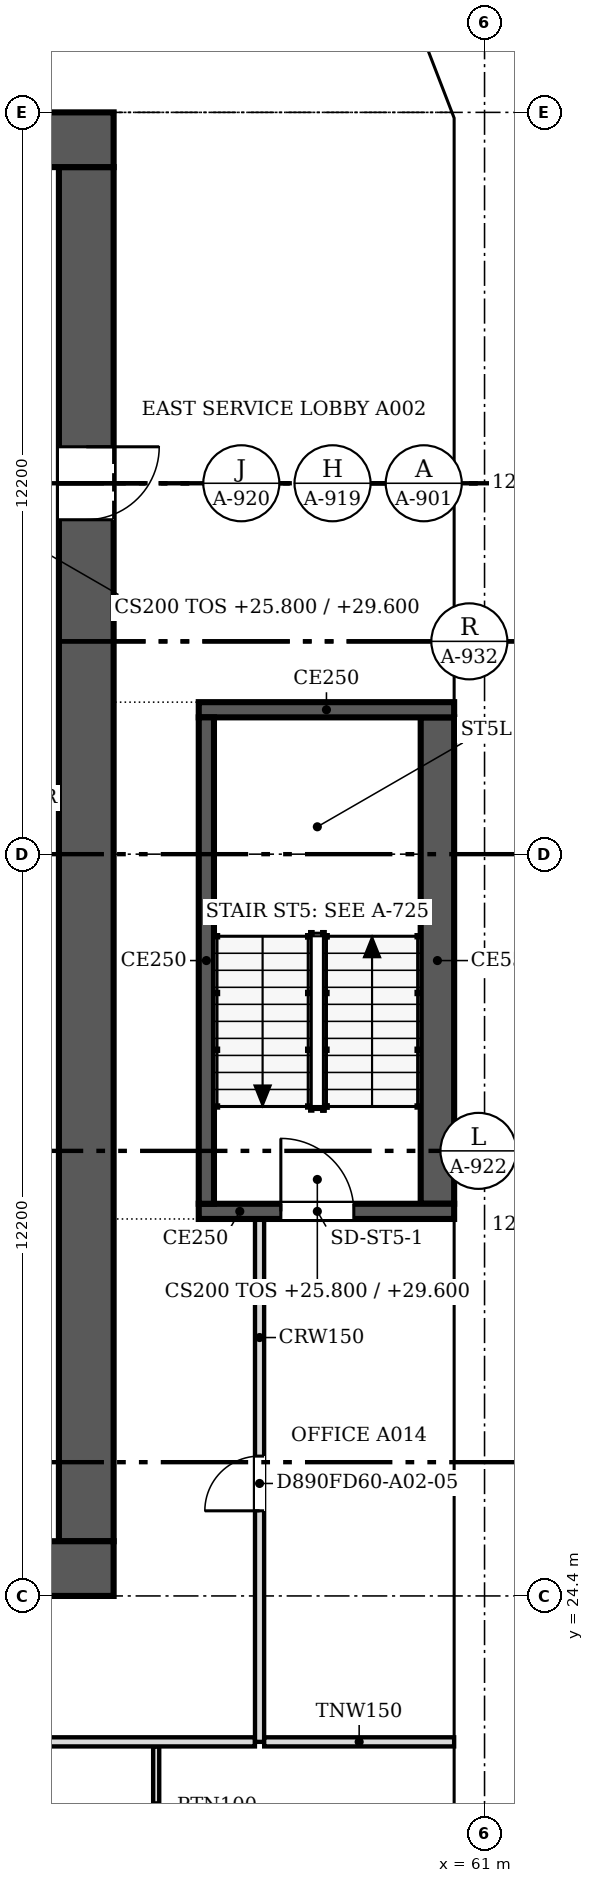
"""IFC4 building model, lengths in metres.
Left out: names, types, materials, properties, quantities, classifications, styles, units other than length and angle.
Written with IfcOpenShell. Run it as: python <this file> out.ifc"""

import sys

from ifc_helpers import new_model, si_unit, direction, frame, frame_2d, origin, place, context, subcontext, project, spatial, polyline, rectangle, outline, extrude, faceted_brep, source, transform, mapped, element, fill, save


model = new_model("IFC4")
c1 = context("Model", 3, precision=1e-05, world=origin(), true_north=direction((0.0, 1.0)))
c2 = subcontext(c1, "Body", "Model", "MODEL_VIEW")
j1 = project(units=[si_unit("LENGTHUNIT", "METRE"), si_unit("PLANEANGLEUNIT", "RADIAN")], contexts=[c1])
p1 = place(None, origin())
s1 = spatial("IfcSite", under=j1, at=p1, CompositionType="ELEMENT")
p2 = place(p1, origin())
s2 = spatial("IfcBuilding", under=s1, at=p2, CompositionType="ELEMENT")
p3 = place(p2, frame((0.0, 0.0, 25.8)))
s3 = spatial("IfcBuildingStorey", under=s2, at=p3, CompositionType="ELEMENT", Elevation=25.8)
m1 = source(origin(), c2, "Body", "Brep", [
    faceted_brep([(6.1, -0.25, 0.0), (3.05, -0.25, 3.8), (0.0, -0.25, 0.0), (6.1, -0.25, 0.0), (0.0, 0.25, 0.0), (3.05, 0.25, 3.8), (6.1, 0.25, 0.0), (6.1, 0.25, 0.0)], [[[0, 1, 2, 3]], [[4, 5, 6, 7]], [[6, 5, 1, 0]], [[5, 4, 2, 1]], [[4, 7, 3, 2]], [[3, 7, 6, 0]]]),
])
p4 = place(p3, frame((60.75, 18.3, 0.0), z_axis=(0.0, 0.0, 1.0), x_axis=(0.0, 1.0, 0.0)))
e1 = element("IfcWall", 1, at=p4, inside=s3, PredefinedType="SOLIDWALL", context=c2, shape_type="MappedRepresentation", body=[
    mapped(m1, transform((0.0, 0.0, 0.0), scale=1.0)),
])
m2 = source(origin(), c2, "Body", "SweptSolid", [
    extrude(outline(polyline([(5.579, 0.25), (3.05, 3.401), (0.521, 0.25), (5.579, 0.25)])), frame((0.0, 0.26, 0.0), z_axis=(0.0, -1.0, 0.0), x_axis=(1.0, 0.0, 0.0)), (0.0, 0.0, 1.0), 0.52),
])
p5 = place(p4, origin())
e2 = element("IfcOpeningElement", 2, at=p5, cuts=e1, PredefinedType="OPENING", context=c2, shape_type="MappedRepresentation", body=[
    mapped(m2, transform((0.0, 0.0, 0.0), scale=1.0)),
])
m3 = source(origin(), c2, "Body", "SweptSolid", [
    extrude(outline(polyline([(6.1, 0.0), (3.05, 3.8), (0.0, 0.0), (6.1, 0.0)])), frame((0.0, 0.25, 0.0), z_axis=(0.0, -1.0, 0.0), x_axis=(1.0, 0.0, 0.0)), (0.0, 0.0, 1.0), 0.5),
])
p6 = place(p3, frame((60.75, 24.4, 0.0), z_axis=(0.0, 0.0, 1.0), x_axis=(0.0, 1.0, 0.0)))
e3 = element("IfcWall", 3, at=p6, inside=s3, PredefinedType="SOLIDWALL", context=c2, shape_type="MappedRepresentation", body=[
    mapped(m3, transform((0.0, 0.0, 0.0), scale=1.0)),
])
p7 = place(p6, origin())
e4 = element("IfcOpeningElement", 4, at=p7, cuts=e3, PredefinedType="OPENING", context=c2, shape_type="MappedRepresentation", body=[
    mapped(m2, transform((0.0, 0.0, 0.0), scale=1.0)),
])
p8 = place(p3, frame((60.75, 30.5, 0.0), z_axis=(0.0, 0.0, 1.0), x_axis=(0.0, 1.0, 0.0)))
e5 = element("IfcWall", 5, at=p8, inside=s3, PredefinedType="SOLIDWALL", context=c2, shape_type="MappedRepresentation", body=[
    mapped(m3, transform((0.0, 0.0, 0.0), scale=1.0)),
])
p9 = place(p8, origin())
e6 = element("IfcOpeningElement", 6, at=p9, cuts=e5, PredefinedType="OPENING", context=c2, shape_type="MappedRepresentation", body=[
    mapped(m2, transform((0.0, 0.0, 0.0), scale=1.0)),
])
p10 = place(p3, frame((60.75, 36.6, 0.0), z_axis=(0.0, 0.0, 1.0), x_axis=(0.0, 1.0, 0.0)))
e7 = element("IfcWall", 7, at=p10, inside=s3, PredefinedType="SOLIDWALL", context=c2, shape_type="MappedRepresentation", body=[
    mapped(m1, transform((0.0, 0.0, 0.0), scale=1.0)),
])
p11 = place(p10, origin())
e8 = element("IfcOpeningElement", 8, at=p11, cuts=e7, PredefinedType="OPENING", context=c2, shape_type="MappedRepresentation", body=[
    mapped(m2, transform((0.0, 0.0, 0.0), scale=1.0)),
])
m4 = source(origin(), c2, "Body", "Brep", [
    faceted_brep([(6.053, -0.25, 0.0), (3.05, -0.25, 3.8), (0.0, -0.25, 0.0), (0.0, 0.25, 0.0), (3.05, 0.25, 3.8), (6.007, 0.25, 0.059), (6.007, 0.25, 0.0), (6.053, 0.0, 0.0)], [[[0, 1, 2]], [[3, 4, 5, 6]], [[5, 4, 1, 0, 7]], [[4, 3, 2, 1]], [[3, 6, 7, 0, 2]], [[7, 6, 5]]]),
])
p12 = place(p3, frame((60.75, 42.7, 0.0), z_axis=(0.0, 0.0, 1.0), x_axis=(0.0, 1.0, 0.0)))
e9 = element("IfcWall", 9, at=p12, inside=s3, PredefinedType="SOLIDWALL", context=c2, shape_type="MappedRepresentation", body=[
    mapped(m4, transform((0.0, 0.0, 0.0), scale=1.0)),
])
m5 = source(origin(), c2, "Body", "SweptSolid", [
    extrude(outline(polyline([(5.537, 0.25), (3.049, 3.399), (0.521, 0.25), (5.537, 0.25)])), frame((0.0, 0.26, 0.0), z_axis=(0.0, -1.0, 0.0), x_axis=(1.0, 0.0, 0.0)), (0.0, 0.0, 1.0), 0.52),
])
p13 = place(p12, origin())
e10 = element("IfcOpeningElement", 10, at=p13, cuts=e9, PredefinedType="OPENING", context=c2, shape_type="MappedRepresentation", body=[
    mapped(m5, transform((0.0, 0.0, 0.0), scale=1.0)),
])
m6 = source(origin(), c2, "Body", "Brep", [
    faceted_brep([(3.003, -0.25, 3.732), (2.95, -0.25, 3.8), (0.0, -0.25, 0.0), (3.003, -0.25, 0.0), (0.047, 0.25, 0.06), (2.898, 0.25, 3.732), (2.898, 0.25, 0.0), (0.047, 0.25, 0.0), (2.95, 0.0, 3.8), (0.0, 0.0, 0.0)], [[[0, 1, 2, 3]], [[4, 5, 6, 7]], [[8, 1, 0]], [[5, 4, 9, 2, 1, 8]], [[7, 6, 3, 2, 9]], [[7, 9, 4]], [[3, 6, 5, 8, 0]]]),
])
p14 = place(p3, frame((60.75, 48.753, 0.0), z_axis=(0.0, 0.0, 1.0), x_axis=(-0.35992665181, 0.932980602862, 0.0)))
e11 = element("IfcWall", 11, at=p14, inside=s3, PredefinedType="SOLIDWALL", context=c2, shape_type="MappedRepresentation", body=[
    mapped(m6, transform((0.0, 0.0, 0.0), scale=1.0)),
])
m7 = source(origin(), c2, "Body", "SweptSolid", [
    extrude(outline(polyline([(2.75, 3.135), (0.511, 0.25), (2.75, 0.25), (2.75, 3.135)])), frame((0.0, 0.26, 0.0), z_axis=(0.0, -1.0, 0.0), x_axis=(1.0, 0.0, 0.0)), (0.0, 0.0, 1.0), 0.52),
])
p15 = place(p14, origin())
e12 = element("IfcOpeningElement", 12, at=p15, cuts=e11, PredefinedType="OPENING", context=c2, shape_type="MappedRepresentation", body=[
    mapped(m7, transform((0.0, 0.0, 0.0), scale=1.0)),
])
p16 = place(p2, frame((0.0, 0.0, 29.6)))
s4 = spatial("IfcBuildingStorey", under=s2, at=p16, CompositionType="ELEMENT", Elevation=29.6)
m8 = source(origin(), c2, "Body", "SweptSolid", [
    extrude(outline(polyline([(3.05, 0.0), (6.1, 3.8), (3.05, 7.6), (0.0, 3.8), (3.05, 0.0)])), frame((0.0, 0.25, 0.0), z_axis=(0.0, -1.0, 0.0), x_axis=(1.0, 0.0, 0.0)), (0.0, 0.0, 1.0), 0.5),
])
p17 = place(p16, frame((60.75, 15.25, -3.8), z_axis=(0.0, 0.0, 1.0), x_axis=(0.0, 1.0, 0.0)))
e13 = element("IfcWall", 13, at=p17, inside=s4, PredefinedType="SOLIDWALL", context=c2, shape_type="MappedRepresentation", body=[
    mapped(m8, transform((0.0, 0.0, 0.0), scale=1.0)),
])
m9 = source(origin(), c2, "Body", "SweptSolid", [
    extrude(outline(polyline([(3.05, 0.399), (5.78, 3.8), (3.05, 7.2), (0.321, 3.8), (3.05, 0.399)])), frame((0.0, 0.26, 0.0), z_axis=(0.0, -1.0, 0.0), x_axis=(1.0, 0.0, 0.0)), (0.0, 0.0, 1.0), 0.52),
])
p18 = place(p17, origin())
e14 = element("IfcOpeningElement", 14, at=p18, cuts=e13, PredefinedType="OPENING", context=c2, shape_type="MappedRepresentation", body=[
    mapped(m9, transform((0.0, 0.0, 0.0), scale=1.0)),
])
m10 = source(origin(), c2, "Body", "Brep", [
    faceted_brep([(3.05, -0.25, 0.0), (6.1, -0.25, 3.8), (6.1, -0.25, 3.8), (3.05, -0.25, 7.6), (0.0, -0.25, 3.8), (0.0, 0.25, 3.8), (3.05, 0.25, 7.6), (6.1, 0.25, 3.8), (6.1, 0.25, 3.8), (3.05, 0.25, 0.0)], [[[0, 1, 2, 3, 4]], [[5, 6, 7, 8, 9]], [[9, 8, 1, 0]], [[7, 6, 3, 2]], [[6, 5, 4, 3]], [[5, 9, 0, 4]], [[1, 8, 7, 2]]]),
])
p19 = place(p16, frame((60.75, 21.35, -3.8), z_axis=(0.0, 0.0, 1.0), x_axis=(0.0, 1.0, 0.0)))
e15 = element("IfcWall", 15, at=p19, inside=s4, PredefinedType="SOLIDWALL", context=c2, shape_type="MappedRepresentation", body=[
    mapped(m10, transform((0.0, 0.0, 0.0), scale=1.0)),
])
p20 = place(p19, origin())
e16 = element("IfcOpeningElement", 16, at=p20, cuts=e15, PredefinedType="OPENING", context=c2, shape_type="MappedRepresentation", body=[
    mapped(m9, transform((0.0, 0.0, 0.0), scale=1.0)),
])
p21 = place(p16, frame((60.75, 27.45, -3.8), z_axis=(0.0, 0.0, 1.0), x_axis=(0.0, 1.0, 0.0)))
e17 = element("IfcWall", 17, at=p21, inside=s4, PredefinedType="SOLIDWALL", context=c2, shape_type="MappedRepresentation", body=[
    mapped(m8, transform((0.0, 0.0, 0.0), scale=1.0)),
])
p22 = place(p21, origin())
e18 = element("IfcOpeningElement", 18, at=p22, cuts=e17, PredefinedType="OPENING", context=c2, shape_type="MappedRepresentation", body=[
    mapped(m9, transform((0.0, 0.0, 0.0), scale=1.0)),
])
p23 = place(p16, frame((60.75, 33.55, -3.8), z_axis=(0.0, 0.0, 1.0), x_axis=(0.0, 1.0, 0.0)))
e19 = element("IfcWall", 19, at=p23, inside=s4, PredefinedType="SOLIDWALL", context=c2, shape_type="MappedRepresentation", body=[
    mapped(m10, transform((0.0, 0.0, 0.0), scale=1.0)),
])
p24 = place(p23, origin())
e20 = element("IfcOpeningElement", 20, at=p24, cuts=e19, PredefinedType="OPENING", context=c2, shape_type="MappedRepresentation", body=[
    mapped(m9, transform((0.0, 0.0, 0.0), scale=1.0)),
])
p25 = place(p16, frame((60.75, 39.65, -3.8), z_axis=(0.0, 0.0, 1.0), x_axis=(0.0, 1.0, 0.0)))
e21 = element("IfcWall", 21, at=p25, inside=s4, PredefinedType="SOLIDWALL", context=c2, shape_type="MappedRepresentation", body=[
    mapped(m8, transform((0.0, 0.0, 0.0), scale=1.0)),
])
p26 = place(p25, origin())
e22 = element("IfcOpeningElement", 22, at=p26, cuts=e21, PredefinedType="OPENING", context=c2, shape_type="MappedRepresentation", body=[
    mapped(m9, transform((0.0, 0.0, 0.0), scale=1.0)),
])
m11 = source(origin(), c2, "Body", "Brep", [
    faceted_brep([(3.003, -0.25, 0.0), (3.05, -0.25, 0.06), (3.05, -0.25, 7.54), (3.003, -0.25, 7.6), (0.0, -0.25, 3.8), (0.0, 0.25, 3.8), (2.957, 0.25, 7.541), (2.957, 0.25, 0.059), (3.003, 0.0, 0.0), (3.003, 0.0, 7.6)], [[[0, 1, 2, 3, 4]], [[5, 6, 7]], [[1, 0, 8]], [[9, 3, 2]], [[6, 5, 4, 3, 9]], [[5, 7, 8, 0, 4]], [[1, 8, 7, 6, 9, 2]]]),
])
p27 = place(p16, frame((60.75, 45.75, -3.8), z_axis=(0.0, 0.0, 1.0), x_axis=(0.0, 1.0, 0.0)))
e23 = element("IfcWall", 23, at=p27, inside=s4, PredefinedType="SOLIDWALL", context=c2, shape_type="MappedRepresentation", body=[
    mapped(m11, transform((0.0, 0.0, 0.0), scale=1.0)),
])
m12 = source(origin(), c2, "Body", "SweptSolid", [
    extrude(outline(polyline([(2.803, 6.944), (0.319, 3.8), (2.803, 0.656), (2.803, 6.944)])), frame((0.0, 0.26, 0.0), z_axis=(0.0, -1.0, 0.0), x_axis=(1.0, 0.0, 0.0)), (0.0, 0.0, 1.0), 0.52),
])
p28 = place(p27, origin())
e24 = element("IfcOpeningElement", 24, at=p28, cuts=e23, PredefinedType="OPENING", context=c2, shape_type="MappedRepresentation", body=[
    mapped(m12, transform((0.0, 0.0, 0.0), scale=1.0)),
])
m13 = source(origin(), c2, "Body", "Brep", [
    faceted_brep([(0.047, -0.25, 0.0), (2.997, -0.25, 3.8), (0.047, -0.25, 7.6), (0.0, -0.25, 7.541), (0.0, -0.25, 0.059), (0.093, 0.25, 7.54), (2.944, 0.25, 3.868), (2.944, 0.25, 3.732), (0.093, 0.25, 0.06), (2.997, 0.0, 3.8), (0.047, 0.0, 0.0), (0.047, 0.0, 7.6)], [[[0, 1, 2, 3, 4]], [[5, 6, 7, 8]], [[8, 7, 9, 1, 0, 10]], [[6, 5, 11, 2, 1, 9]], [[3, 2, 11]], [[10, 0, 4]], [[8, 10, 4, 3, 11, 5]], [[7, 6, 9]]]),
])
p29 = place(p16, frame((60.767, 48.71, -3.8), z_axis=(0.0, 0.0, 1.0), x_axis=(-0.359901446078, 0.932990326376, 0.0)))
e25 = element("IfcWall", 25, at=p29, inside=s4, PredefinedType="SOLIDWALL", context=c2, shape_type="MappedRepresentation", body=[
    mapped(m13, transform((0.0, 0.0, 0.0), scale=1.0)),
])
m14 = source(origin(), c2, "Body", "SweptSolid", [
    extrude(outline(polyline([(0.247, 0.665), (2.681, 3.8), (0.247, 6.935), (0.247, 0.665)])), frame((0.0, 0.26, 0.0), z_axis=(0.0, -1.0, 0.0), x_axis=(1.0, 0.0, 0.0)), (0.0, 0.0, 1.0), 0.52),
])
p30 = place(p29, origin())
e26 = element("IfcOpeningElement", 26, at=p30, cuts=e25, PredefinedType="OPENING", context=c2, shape_type="MappedRepresentation", body=[
    mapped(m14, transform((0.0, 0.0, 0.0), scale=1.0)),
])
p31 = place(p3, frame((54.9, 24.85, 0.0), z_axis=(0.0, 0.0, 1.0), x_axis=(-1.0, 0.0, 0.0)))
e27 = element("IfcWall", 27, at=p31, inside=s3, PredefinedType="SHEAR", context=c2, shape_type="SweptSolid", body=[
    extrude(rectangle(XDim=24.4, YDim=0.9, at=frame_2d((12.2, 0.0))), origin(), (0.0, 0.0, 1.0), 3.8),
])
m15 = source(origin(), c2, "Body", "SweptSolid", [
    extrude(rectangle(XDim=1.2, YDim=2.1, at=frame_2d((0.6, 1.05))), frame((0.0, 0.46, 0.0), z_axis=(0.0, -1.0, 0.0), x_axis=(1.0, 0.0, 0.0)), (0.0, 0.0, 1.0), 0.92),
])
p32 = place(p31, frame((1.5, 0.0, 0.0)))
e28 = element("IfcOpeningElement", 28, at=p32, cuts=e27, PredefinedType="OPENING", context=c2, shape_type="MappedRepresentation", body=[
    mapped(m15, transform((0.0, 0.0, 0.0), scale=1.0)),
])
p33 = place(p3, frame((30.5, 48.35, 0.0), z_axis=(0.0, 0.0, 1.0), x_axis=(1.0, 0.0, 0.0)))
e29 = element("IfcWall", 29, at=p33, inside=s3, PredefinedType="SHEAR", context=c2, shape_type="SweptSolid", body=[
    extrude(rectangle(XDim=24.4, YDim=0.9, at=frame_2d((12.2, 0.0))), origin(), (0.0, 0.0, 1.0), 3.8),
])
p34 = place(p3, frame((54.45, 47.9, 0.0), z_axis=(0.0, 0.0, 1.0), x_axis=(0.0, -1.0, 0.0)))
e30 = element("IfcWall", 30, at=p34, inside=s3, PredefinedType="SHEAR", context=c2, shape_type="SweptSolid", body=[
    extrude(rectangle(XDim=22.6, YDim=0.9, at=frame_2d((11.3, 0.0))), origin(), (0.0, 0.0, 1.0), 3.8),
])
p35 = place(p34, frame((4.6, 0.0, 0.0)))
e31 = element("IfcOpeningElement", 31, at=p35, cuts=e30, PredefinedType="OPENING", context=c2, shape_type="MappedRepresentation", body=[
    mapped(m15, transform((0.0, 0.0, 0.0), scale=1.0)),
])
p36 = place(p3, frame((60.5, 30.725, 0.0), z_axis=(0.0, 0.0, 1.0), x_axis=(-1.0, 0.0, 0.0)))
e32 = element("IfcWall", 32, at=p36, inside=s3, PredefinedType="SOLIDWALL", context=c2, shape_type="SweptSolid", body=[
    extrude(rectangle(XDim=4.2, YDim=0.25, at=frame_2d((2.1, 0.0))), origin(), (0.0, 0.0, 1.0), 3.8),
])
m16 = source(origin(), c2, "Body", "SweptSolid", [
    extrude(rectangle(XDim=1.2, YDim=2.1, at=frame_2d((0.6, 1.05))), frame((0.0, 0.135, 0.0), z_axis=(0.0, -1.0, 0.0), x_axis=(1.0, 0.0, 0.0)), (0.0, 0.0, 1.0), 0.27),
])
p37 = place(p36, frame((1.65, 0.0, 0.0)))
e33 = element("IfcOpeningElement", 33, at=p37, cuts=e32, PredefinedType="OPENING", context=c2, shape_type="MappedRepresentation", body=[
    mapped(m16, transform((0.0, 0.0, 0.0), scale=1.0)),
])
p38 = place(p3, frame((56.425, 30.85, 0.0), z_axis=(0.0, 0.0, 1.0), x_axis=(0.0, 1.0, 0.0)))
e34 = element("IfcWall", 34, at=p38, inside=s3, PredefinedType="SOLIDWALL", context=c2, shape_type="SweptSolid", body=[
    extrude(rectangle(XDim=8.0, YDim=0.25, at=frame_2d((4.0, 0.0))), origin(), (0.0, 0.0, 1.0), 3.8),
])
p39 = place(p3, frame((56.3, 38.975, 0.0), z_axis=(0.0, 0.0, 1.0), x_axis=(1.0, 0.0, 0.0)))
e35 = element("IfcWall", 35, at=p39, inside=s3, PredefinedType="SOLIDWALL", context=c2, shape_type="SweptSolid", body=[
    extrude(rectangle(XDim=4.2, YDim=0.25, at=frame_2d((2.1, 0.0))), origin(), (0.0, 0.0, 1.0), 3.8),
])
p40 = place(p3, frame((60.225, 38.85, 0.0), z_axis=(0.0, 0.0, 1.0), x_axis=(0.0, -1.0, 0.0)))
e36 = element("IfcWall", 36, at=p40, inside=s3, PredefinedType="SOLIDWALL", context=c2, shape_type="SweptSolid", body=[
    extrude(rectangle(XDim=8.0, YDim=0.55, at=frame_2d((4.0, 0.0))), origin(), (0.0, 0.0, 1.0), 3.8),
])
p41 = place(p3, frame((55.6, 21.924, 0.0), z_axis=(0.0, 0.0, 1.0), x_axis=(0.0, -1.0, 0.0)))
e37 = element("IfcWall", 37, at=p41, inside=s3, PredefinedType="PARTITIONING", context=c2, shape_type="SweptSolid", body=[
    extrude(rectangle(XDim=4.748, YDim=0.1, at=frame_2d((2.374, 0.0))), origin(), (0.0, 0.0, 1.0), 3.067),
])
m17 = source(origin(), c2, "Body", "SweptSolid", [
    extrude(rectangle(XDim=0.9, YDim=2.1, at=frame_2d((0.45, 1.05))), frame((0.0, 0.06, 0.0), z_axis=(0.0, -1.0, 0.0), x_axis=(1.0, 0.0, 0.0)), (0.0, 0.0, 1.0), 0.12),
])
p42 = place(p41, frame((1.948, 0.0, 0.0)))
e38 = element("IfcOpeningElement", 38, at=p42, cuts=e37, PredefinedType="OPENING", context=c2, shape_type="MappedRepresentation", body=[
    mapped(m17, transform((0.0, 0.0, 0.0), scale=1.0)),
])
p43 = place(p3, frame((45.476, 22.0, 0.0), z_axis=(0.0, 0.0, 1.0), x_axis=(1.0, 0.0, 0.0)))
e39 = element("IfcWall", 39, at=p43, inside=s3, PredefinedType="PARTITIONING", context=c2, shape_type="SweptSolid", body=[
    extrude(rectangle(XDim=11.748, YDim=0.15, at=frame_2d((5.874, 0.0))), origin(), (0.0, 0.0, 1.0), 3.067),
])
p44 = place(p3, frame((57.3, 30.6, 0.0), z_axis=(0.0, 0.0, 1.0), x_axis=(0.0, -1.0, 0.0)))
e40 = element("IfcWall", 40, at=p44, inside=s3, PredefinedType="PARTITIONING", context=c2, shape_type="SweptSolid", body=[
    extrude(rectangle(XDim=8.6, YDim=0.15, at=frame_2d((4.3, 0.0))), origin(), (0.0, 0.0, 1.0), 3.067),
])
m18 = source(origin(), c2, "Body", "SweptSolid", [
    extrude(rectangle(XDim=0.9, YDim=2.1, at=frame_2d((0.45, 1.05))), frame((0.0, 0.085, 0.0), z_axis=(0.0, -1.0, 0.0), x_axis=(1.0, 0.0, 0.0)), (0.0, 0.0, 1.0), 0.17),
])
p45 = place(p44, frame((3.9, 0.0, 0.0)))
e41 = element("IfcOpeningElement", 41, at=p45, cuts=e40, PredefinedType="OPENING", context=c2, shape_type="MappedRepresentation", body=[
    mapped(m18, transform((0.0, 0.0, 0.0), scale=1.0)),
])
p46 = place(p3, frame((57.376, 22.0, 0.0), z_axis=(0.0, 0.0, 1.0), x_axis=(1.0, 0.0, 0.0)))
e42 = element("IfcWall", 42, at=p46, inside=s3, PredefinedType="PARTITIONING", context=c2, shape_type="SweptSolid", body=[
    extrude(rectangle(XDim=3.124, YDim=0.15, at=frame_2d((1.562, 0.0))), origin(), (0.0, 0.0, 1.0), 3.067),
])
m19 = source(origin(), c2, "Body", "SweptSolid", [
    extrude(rectangle(XDim=1.2, YDim=2.1, at=frame_2d((0.6, 1.05))), frame((0.0, 0.025, 0.0), z_axis=(0.0, -1.0, 0.0), x_axis=(1.0, 0.0, 0.0)), (0.0, 0.0, 1.0), 0.05),
])
p47 = place(p35, origin())
e43 = element("IfcDoor", 43, at=p47, inside=s3, OperationType="SINGLE_SWING_LEFT", PredefinedType="DOOR", context=c2, shape_type="MappedRepresentation", body=[
    mapped(m19, transform((0.0, 0.0, 0.0), scale=1.0)),
])
fill(e31, e43)
p48 = place(p37, origin())
e44 = element("IfcDoor", 44, at=p48, inside=s3, OperationType="SINGLE_SWING_RIGHT", PredefinedType="DOOR", context=c2, shape_type="MappedRepresentation", body=[
    mapped(m19, transform((0.0, 0.0, 0.0), scale=1.0)),
])
fill(e33, e44)
m20 = source(origin(), c2, "Body", "SweptSolid", [
    extrude(rectangle(XDim=0.9, YDim=2.1, at=frame_2d((0.45, 1.05))), frame((0.0, 0.025, 0.0), z_axis=(0.0, -1.0, 0.0), x_axis=(1.0, 0.0, 0.0)), (0.0, 0.0, 1.0), 0.05),
])
p49 = place(p45, origin())
e45 = element("IfcDoor", 45, at=p49, inside=s3, OperationType="SINGLE_SWING_RIGHT", PredefinedType="DOOR", context=c2, shape_type="MappedRepresentation", body=[
    mapped(m20, transform((0.0, 0.0, 0.0), scale=1.0)),
])
fill(e41, e45)
save(model, sys.argv[1])
